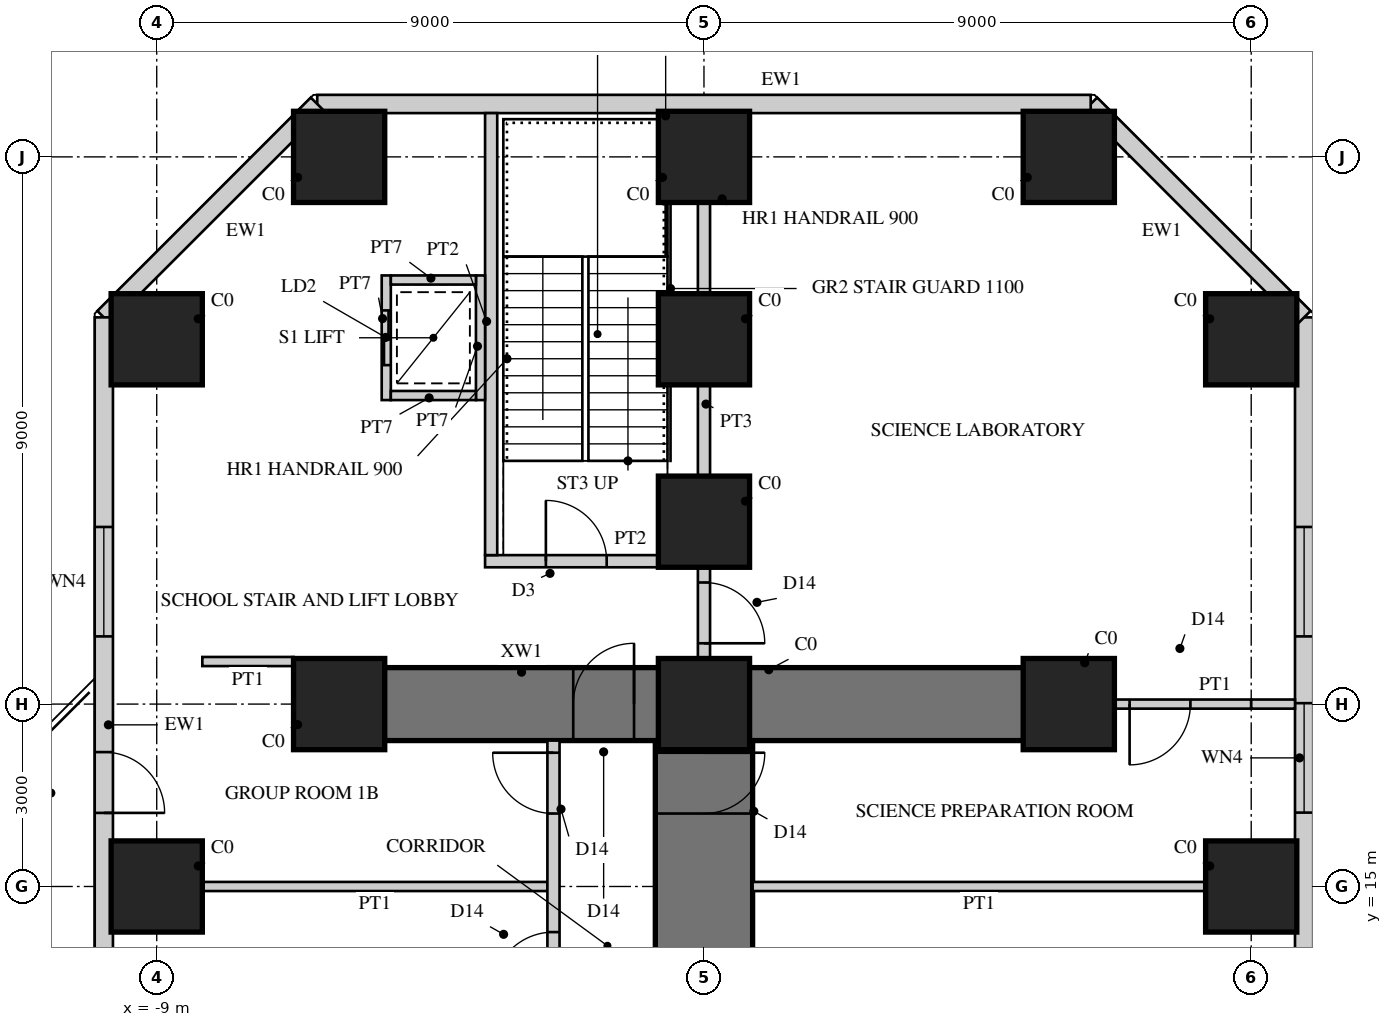
"""IFC4 building model, lengths in metres.
Left out: names, types, materials, properties, quantities, classifications, styles, units other than length and angle.
Written with IfcOpenShell. Run it as: python <this file> out.ifc"""

import sys

from ifc_helpers import new_model, si_unit, direction, frame, frame_2d, origin, origin_2d, place, context, subcontext, project, spatial, rectangle, hollow_rectangle, extrude, element, fill, save


model = new_model("IFC4")
c1 = context("Model", 3, precision=1e-05, world=origin(), true_north=direction((0.0, 1.0)))
c2 = subcontext(c1, "Body", "Model", "MODEL_VIEW")
j1 = project(units=[si_unit("LENGTHUNIT", "METRE"), si_unit("PLANEANGLEUNIT", "RADIAN")], contexts=[c1])
p1 = place(None, origin())
s1 = spatial("IfcSite", under=j1, at=p1, CompositionType="ELEMENT")
p2 = place(p1, origin())
s2 = spatial("IfcBuilding", under=s1, at=p2, CompositionType="ELEMENT")
p3 = place(p2, frame((0.0, 0.0, 5.0)))
s3 = spatial("IfcBuildingStorey", under=s2, at=p3, CompositionType="ELEMENT", Elevation=5.0)
p4 = place(p3, frame((0.0, 9.0, 0.0), z_axis=(0.0, 0.0, 1.0), x_axis=(0.0, 1.0, 0.0)))
e1 = element("IfcWall", 1, at=p4, inside=s3, PredefinedType="SHEAR", context=c2, shape_type="SweptSolid", body=[
    extrude(rectangle(XDim=9.0, YDim=1.6, at=frame_2d((4.5, 0.0))), origin(), (0.0, 0.0, 1.0), 4.5),
])
p5 = place(p4, frame((1.85, 0.0, 0.0)))
e2 = element("IfcOpeningElement", 2, at=p5, cuts=e1, PredefinedType="OPENING", context=c2, shape_type="SweptSolid", body=[
    extrude(rectangle(XDim=1.0, YDim=2.2, at=frame_2d((0.5, 1.1))), frame((0.0, 0.81, 0.0), z_axis=(0.0, -1.0, 0.0), x_axis=(1.0, 0.0, 0.0)), (0.0, 0.0, 1.0), 1.62),
])
p6 = place(p4, frame((7.2, 0.0, 0.0)))
e3 = element("IfcOpeningElement", 3, at=p6, cuts=e1, PredefinedType="OPENING", context=c2, shape_type="SweptSolid", body=[
    extrude(rectangle(XDim=1.0, YDim=2.2, at=frame_2d((0.5, 1.1))), frame((0.0, 0.81, 0.0), z_axis=(0.0, -1.0, 0.0), x_axis=(1.0, 0.0, 0.0)), (0.0, 0.0, 1.0), 1.62),
])
p7 = place(p3, frame((0.0, 18.0, 0.0), z_axis=(0.0, 0.0, 1.0), x_axis=(-1.0, 0.0, 0.0)))
e4 = element("IfcWall", 4, at=p7, inside=s3, PredefinedType="SHEAR", context=c2, shape_type="SweptSolid", body=[
    extrude(rectangle(XDim=6.0, YDim=1.2, at=frame_2d((3.0, 0.0))), origin(), (0.0, 0.0, 1.0), 4.5),
])
p8 = place(p7, frame((1.15, 0.0, 0.0)))
e5 = element("IfcOpeningElement", 5, at=p8, cuts=e4, PredefinedType="OPENING", context=c2, shape_type="SweptSolid", body=[
    extrude(rectangle(XDim=1.0, YDim=2.2, at=frame_2d((0.5, 1.1))), frame((0.0, 0.61, 0.0), z_axis=(0.0, -1.0, 0.0), x_axis=(1.0, 0.0, 0.0)), (0.0, 0.0, 1.0), 1.22),
])
p9 = place(p3, frame((0.0, 18.0, 0.0), z_axis=(0.0, 0.0, 1.0), x_axis=(1.0, 0.0, 0.0)))
e6 = element("IfcWall", 6, at=p9, inside=s3, PredefinedType="SHEAR", context=c2, shape_type="SweptSolid", body=[
    extrude(rectangle(XDim=6.0, YDim=1.2, at=frame_2d((3.0, 0.0))), origin(), (0.0, 0.0, 1.0), 4.5),
])
for number, where, z_axis, x_axis in (
    (7, (9.0, 15.0, 0.0), (0.0, 0.0, 1.0), (1.0, 0.0, 0.0)),
    (8, (9.0, 24.0, 0.0), (0.0, 0.0, 1.0), (1.0, 0.0, 0.0)),
    (9, (-9.0, 15.0, 0.0), (0.0, 0.0, 1.0), (1.0, 0.0, 0.0)),
    (10, (-9.0, 24.0, 0.0), (0.0, 0.0, 1.0), (1.0, 0.0, 0.0)),
    (11, (6.0, 27.0, 0.0), (0.0, 0.0, 1.0), (1.0, 0.0, 0.0)),
    (12, (0.0, 27.0, 0.0), (0.0, 0.0, 1.0), (1.0, 0.0, 0.0)),
    (13, (-6.0, 27.0, 0.0), (0.0, 0.0, 1.0), (1.0, 0.0, 0.0)),
    (14, (6.0, 18.0, 0.0), (0.0, 0.0, 1.0), (1.0, 0.0, 0.0)),
    (15, (0.0, 18.0, 0.0), (0.0, 0.0, 1.0), (1.0, 0.0, 0.0)),
    (16, (-6.0, 18.0, 0.0), (0.0, 0.0, 1.0), (1.0, 0.0, 0.0)),
    (17, (0.0, 21.0, 0.0), (0.0, 0.0, 1.0), (1.0, 0.0, 0.0)),
    (18, (0.0, 24.0, 0.0), (0.0, 0.0, 1.0), (1.0, 0.0, 0.0)),
):
    element("IfcColumn", number, at=place(p3, frame(where, z_axis=z_axis, x_axis=x_axis)), inside=s3, PredefinedType="COLUMN", context=c2, shape_type="SweptSolid", body=[
        extrude(rectangle(XDim=1.5, YDim=1.5, at=origin_2d()), origin(), (0.0, 0.0, 1.0), 4.5),
    ])
p10 = place(p3, frame((9.87, 9.87, 0.0), z_axis=(0.0, 0.0, 1.0), x_axis=(0.0, 1.0, 0.0)))
e19 = element("IfcWall", 19, at=p10, inside=s3, PredefinedType="SOLIDWALL", context=c2, shape_type="SweptSolid", body=[
    extrude(rectangle(XDim=14.49, YDim=0.3, at=frame_2d((7.245, 0.0))), origin(), (0.0, 0.0, 1.0), 4.3),
])
p11 = place(p10, frame((2.9, 0.0, 0.0)))
e20 = element("IfcOpeningElement", 20, at=p11, cuts=e19, PredefinedType="OPENING", context=c2, shape_type="SweptSolid", body=[
    extrude(rectangle(XDim=1.0, YDim=2.4, at=frame_2d((0.5, 1.2))), frame((0.0, 0.16, 0.0), z_axis=(0.0, -1.0, 0.0), x_axis=(1.0, 0.0, 0.0)), (0.0, 0.0, 1.0), 0.32),
])
p12 = place(p10, frame((0.549, 0.0, 0.6)))
e21 = element("IfcOpeningElement", 21, at=p12, cuts=e19, PredefinedType="OPENING", context=c2, shape_type="SweptSolid", body=[
    extrude(rectangle(XDim=1.8, YDim=2.1, at=frame_2d((0.9, 1.05))), frame((0.0, 0.16, 0.0), z_axis=(0.0, -1.0, 0.0), x_axis=(1.0, 0.0, 0.0)), (0.0, 0.0, 1.0), 0.32),
])
p13 = place(p10, frame((6.345, 0.0, 0.6)))
e22 = element("IfcOpeningElement", 22, at=p13, cuts=e19, PredefinedType="OPENING", context=c2, shape_type="SweptSolid", body=[
    extrude(rectangle(XDim=1.8, YDim=2.1, at=frame_2d((0.9, 1.05))), frame((0.0, 0.16, 0.0), z_axis=(0.0, -1.0, 0.0), x_axis=(1.0, 0.0, 0.0)), (0.0, 0.0, 1.0), 0.32),
])
p14 = place(p10, frame((9.243, 0.0, 0.6)))
e23 = element("IfcOpeningElement", 23, at=p14, cuts=e19, PredefinedType="OPENING", context=c2, shape_type="SweptSolid", body=[
    extrude(rectangle(XDim=1.8, YDim=2.1, at=frame_2d((0.9, 1.05))), frame((0.0, 0.16, 0.0), z_axis=(0.0, -1.0, 0.0), x_axis=(1.0, 0.0, 0.0)), (0.0, 0.0, 1.0), 0.32),
])
p15 = place(p3, frame((9.87, 24.36, 0.0), z_axis=(0.0, 0.0, 1.0), x_axis=(-0.707106781187, 0.707106781187, 0.0)))
e24 = element("IfcWall", 24, at=p15, inside=s3, PredefinedType="SOLIDWALL", context=c2, shape_type="SweptSolid", body=[
    extrude(rectangle(XDim=4.964, YDim=0.3, at=frame_2d((2.482, 0.0))), origin(), (0.0, 0.0, 1.0), 4.3),
])
p16 = place(p3, frame((6.36, 27.87, 0.0), z_axis=(0.0, 0.0, 1.0), x_axis=(-1.0, 0.0, 0.0)))
e25 = element("IfcWall", 25, at=p16, inside=s3, PredefinedType="SOLIDWALL", context=c2, shape_type="SweptSolid", body=[
    extrude(rectangle(XDim=12.721, YDim=0.3, at=frame_2d((6.36, 0.0))), origin(), (0.0, 0.0, 1.0), 4.3),
])
p17 = place(p3, frame((-6.36, 27.87, 0.0), z_axis=(0.0, 0.0, 1.0), x_axis=(-0.707106781187, -0.707106781187, 0.0)))
e26 = element("IfcWall", 26, at=p17, inside=s3, PredefinedType="SOLIDWALL", context=c2, shape_type="SweptSolid", body=[
    extrude(rectangle(XDim=4.964, YDim=0.3, at=frame_2d((2.482, 0.0))), origin(), (0.0, 0.0, 1.0), 4.3),
])
p18 = place(p3, frame((-9.87, 24.36, 0.0), z_axis=(0.0, 0.0, 1.0), x_axis=(0.0, -1.0, 0.0)))
e27 = element("IfcWall", 27, at=p18, inside=s3, PredefinedType="SOLIDWALL", context=c2, shape_type="SweptSolid", body=[
    extrude(rectangle(XDim=14.49, YDim=0.3, at=frame_2d((7.245, 0.0))), origin(), (0.0, 0.0, 1.0), 4.3),
])
p19 = place(p18, frame((7.15, 0.0, 0.0)))
e28 = element("IfcOpeningElement", 28, at=p19, cuts=e27, PredefinedType="OPENING", context=c2, shape_type="SweptSolid", body=[
    extrude(rectangle(XDim=1.0, YDim=2.4, at=frame_2d((0.5, 1.2))), frame((0.0, 0.16, 0.0), z_axis=(0.0, -1.0, 0.0), x_axis=(1.0, 0.0, 0.0)), (0.0, 0.0, 1.0), 0.32),
])
p20 = place(p18, frame((3.447, 0.0, 0.6)))
e29 = element("IfcOpeningElement", 29, at=p20, cuts=e27, PredefinedType="OPENING", context=c2, shape_type="SweptSolid", body=[
    extrude(rectangle(XDim=1.8, YDim=2.1, at=frame_2d((0.9, 1.05))), frame((0.0, 0.16, 0.0), z_axis=(0.0, -1.0, 0.0), x_axis=(1.0, 0.0, 0.0)), (0.0, 0.0, 1.0), 0.32),
])
p21 = place(p18, frame((12.141, 0.0, 0.6)))
e30 = element("IfcOpeningElement", 30, at=p21, cuts=e27, PredefinedType="OPENING", context=c2, shape_type="SweptSolid", body=[
    extrude(rectangle(XDim=1.8, YDim=2.1, at=frame_2d((0.9, 1.05))), frame((0.0, 0.16, 0.0), z_axis=(0.0, -1.0, 0.0), x_axis=(1.0, 0.0, 0.0)), (0.0, 0.0, 1.0), 0.32),
])
p22 = place(p3, frame((-2.575, 15.0, 0.0), z_axis=(0.0, 0.0, 1.0), x_axis=(-1.0, 0.0, 0.0)))
e31 = element("IfcWall", 31, at=p22, inside=s3, PredefinedType="PARTITIONING", context=c2, shape_type="SweptSolid", body=[
    extrude(rectangle(XDim=5.675, YDim=0.15, at=frame_2d((2.837, 0.0))), origin(), (0.0, 0.0, 1.0), 3.35),
])
p23 = place(p3, frame((8.25, 15.0, 0.0), z_axis=(0.0, 0.0, 1.0), x_axis=(-1.0, 0.0, 0.0)))
e32 = element("IfcWall", 32, at=p23, inside=s3, PredefinedType="PARTITIONING", context=c2, shape_type="SweptSolid", body=[
    extrude(rectangle(XDim=7.45, YDim=0.15, at=frame_2d((3.725, 0.0))), origin(), (0.0, 0.0, 1.0), 3.35),
])
p24 = place(p3, frame((-2.475, 9.65, 0.0), z_axis=(0.0, 0.0, 1.0), x_axis=(0.0, 1.0, 0.0)))
e33 = element("IfcWall", 33, at=p24, inside=s3, PredefinedType="SOLIDWALL", context=c2, shape_type="SweptSolid", body=[
    extrude(rectangle(XDim=7.75, YDim=0.2, at=frame_2d((3.875, 0.0))), origin(), (0.0, 0.0, 1.0), 4.3),
])
p25 = place(p24, frame((1.2, 0.0, 0.0)))
e34 = element("IfcOpeningElement", 34, at=p25, cuts=e33, PredefinedType="OPENING", context=c2, shape_type="SweptSolid", body=[
    extrude(rectangle(XDim=1.0, YDim=2.2, at=frame_2d((0.5, 1.1))), frame((0.0, 0.11, 0.0), z_axis=(0.0, -1.0, 0.0), x_axis=(1.0, 0.0, 0.0)), (0.0, 0.0, 1.0), 0.22),
])
p26 = place(p24, frame((3.6, 0.0, 0.0)))
e35 = element("IfcOpeningElement", 35, at=p26, cuts=e33, PredefinedType="OPENING", context=c2, shape_type="SweptSolid", body=[
    extrude(rectangle(XDim=1.0, YDim=2.2, at=frame_2d((0.5, 1.1))), frame((0.0, 0.11, 0.0), z_axis=(0.0, -1.0, 0.0), x_axis=(1.0, 0.0, 0.0)), (0.0, 0.0, 1.0), 0.22),
])
p27 = place(p24, frame((6.55, 0.0, 0.0)))
e36 = element("IfcOpeningElement", 36, at=p27, cuts=e33, PredefinedType="OPENING", context=c2, shape_type="SweptSolid", body=[
    extrude(rectangle(XDim=1.0, YDim=2.2, at=frame_2d((0.5, 1.1))), frame((0.0, 0.11, 0.0), z_axis=(0.0, -1.0, 0.0), x_axis=(1.0, 0.0, 0.0)), (0.0, 0.0, 1.0), 0.22),
])
p28 = place(p3, frame((-6.75, 18.7, 0.0), z_axis=(0.0, 0.0, 1.0), x_axis=(-1.0, 0.0, 0.0)))
e37 = element("IfcWall", 37, at=p28, inside=s3, PredefinedType="PARTITIONING", context=c2, shape_type="SweptSolid", body=[
    extrude(rectangle(XDim=1.5, YDim=0.15, at=frame_2d((0.75, 0.0))), origin(), (0.0, 0.0, 1.0), 4.3),
])
p29 = place(p3, frame((-0.1, 20.35, 0.0), z_axis=(0.0, 0.0, 1.0), x_axis=(-1.0, 0.0, 0.0)))
e38 = element("IfcWall", 38, at=p29, inside=s3, PredefinedType="SOLIDWALL", context=c2, shape_type="SweptSolid", body=[
    extrude(rectangle(XDim=3.5, YDim=0.2, at=frame_2d((1.75, 0.0))), origin(), (0.0, 0.0, 1.0), 4.3),
])
p30 = place(p29, frame((1.5, 0.0, 0.0)))
e39 = element("IfcOpeningElement", 39, at=p30, cuts=e38, PredefinedType="OPENING", context=c2, shape_type="SweptSolid", body=[
    extrude(rectangle(XDim=1.0, YDim=2.1, at=frame_2d((0.5, 1.05))), frame((0.0, 0.11, 0.0), z_axis=(0.0, -1.0, 0.0), x_axis=(1.0, 0.0, 0.0)), (0.0, 0.0, 1.0), 0.22),
])
p31 = place(p3, frame((-3.5, 20.45, 0.0), z_axis=(0.0, 0.0, 1.0), x_axis=(0.0, 1.0, 0.0)))
e40 = element("IfcWall", 40, at=p31, inside=s3, PredefinedType="SOLIDWALL", context=c2, shape_type="SweptSolid", body=[
    extrude(rectangle(XDim=7.27, YDim=0.2, at=frame_2d((3.635, 0.0))), origin(), (0.0, 0.0, 1.0), 4.3),
])
p32 = place(p3, frame((-3.675, 23.0, 0.0), z_axis=(0.0, 0.0, 1.0), x_axis=(0.0, 1.0, 0.0)))
e41 = element("IfcWall", 41, at=p32, inside=s3, PredefinedType="PARTITIONING", context=c2, shape_type="SweptSolid", body=[
    extrude(rectangle(XDim=2.05, YDim=0.15, at=frame_2d((1.025, 0.0))), origin(), (0.0, 0.0, 1.0), 4.3),
])
p33 = place(p3, frame((-5.225, 23.0, 0.0), z_axis=(0.0, 0.0, 1.0), x_axis=(0.0, 1.0, 0.0)))
e42 = element("IfcWall", 42, at=p33, inside=s3, PredefinedType="PARTITIONING", context=c2, shape_type="SweptSolid", body=[
    extrude(rectangle(XDim=2.05, YDim=0.15, at=frame_2d((1.025, 0.0))), origin(), (0.0, 0.0, 1.0), 4.3),
])
p34 = place(p33, frame((0.575, 0.0, 0.0)))
e43 = element("IfcOpeningElement", 43, at=p34, cuts=e42, PredefinedType="OPENING", context=c2, shape_type="SweptSolid", body=[
    extrude(rectangle(XDim=0.9, YDim=2.1, at=frame_2d((0.45, 1.05))), frame((0.0, 0.085, 0.0), z_axis=(0.0, -1.0, 0.0), x_axis=(1.0, 0.0, 0.0)), (0.0, 0.0, 1.0), 0.17),
])
for number, where, z_axis, x_axis in (
    (44, (-3.75, 23.075, 0.0), (0.0, 0.0, 1.0), (-1.0, 0.0, 0.0)),
    (45, (-3.75, 24.975, 0.0), (0.0, 0.0, 1.0), (-1.0, 0.0, 0.0)),
):
    element("IfcWall", number, at=place(p3, frame(where, z_axis=z_axis, x_axis=x_axis)), inside=s3, PredefinedType="PARTITIONING", context=c2, shape_type="SweptSolid", body=[
        extrude(rectangle(XDim=1.4, YDim=0.15, at=frame_2d((0.7, 0.0))), origin(), (0.0, 0.0, 1.0), 4.3),
    ])
p35 = place(p3, frame((6.75, 18.0, 0.0), z_axis=(0.0, 0.0, 1.0), x_axis=(1.0, 0.0, 0.0)))
e46 = element("IfcWall", 46, at=p35, inside=s3, PredefinedType="PARTITIONING", context=c2, shape_type="SweptSolid", body=[
    extrude(rectangle(XDim=2.25, YDim=0.15, at=frame_2d((1.125, 0.0))), origin(), (0.0, 0.0, 1.0), 3.35),
])
p36 = place(p35, frame((0.25, 0.0, 0.0)))
e47 = element("IfcOpeningElement", 47, at=p36, cuts=e46, PredefinedType="OPENING", context=c2, shape_type="SweptSolid", body=[
    extrude(rectangle(XDim=1.0, YDim=2.2, at=frame_2d((0.5, 1.1))), frame((0.0, 0.085, 0.0), z_axis=(0.0, -1.0, 0.0), x_axis=(1.0, 0.0, 0.0)), (0.0, 0.0, 1.0), 0.17),
])
p37 = place(p3, frame((9.0, 18.0, 0.0), z_axis=(0.0, 0.0, 1.0), x_axis=(1.0, 0.0, 0.0)))
e48 = element("IfcWall", 48, at=p37, inside=s3, PredefinedType="PARTITIONING", context=c2, shape_type="SweptSolid", body=[
    extrude(rectangle(XDim=0.72, YDim=0.15, at=frame_2d((0.36, 0.0))), origin(), (0.0, 0.0, 1.0), 4.3),
])
p38 = place(p3, frame((0.0, 18.0, 0.0), z_axis=(0.0, 0.0, 1.0), x_axis=(0.0, 1.0, 0.0)))
e49 = element("IfcWall", 49, at=p38, inside=s3, PredefinedType="SOLIDWALL", context=c2, shape_type="SweptSolid", body=[
    extrude(rectangle(XDim=3.0, YDim=0.2, at=frame_2d((1.5, 0.0))), origin(), (0.0, 0.0, 1.0), 4.3),
])
p39 = place(p38, frame((1.0, 0.0, 0.0)))
e50 = element("IfcOpeningElement", 50, at=p39, cuts=e49, PredefinedType="OPENING", context=c2, shape_type="SweptSolid", body=[
    extrude(rectangle(XDim=1.0, YDim=2.2, at=frame_2d((0.5, 1.1))), frame((0.0, 0.11, 0.0), z_axis=(0.0, -1.0, 0.0), x_axis=(1.0, 0.0, 0.0)), (0.0, 0.0, 1.0), 0.22),
])
p40 = place(p3, frame((0.0, 21.0, 0.0), z_axis=(0.0, 0.0, 1.0), x_axis=(0.0, 1.0, 0.0)))
e51 = element("IfcWall", 51, at=p40, inside=s3, PredefinedType="SOLIDWALL", context=c2, shape_type="SweptSolid", body=[
    extrude(rectangle(XDim=6.0, YDim=0.2, at=frame_2d((3.0, 0.0))), origin(), (0.0, 0.0, 1.0), 3.3),
])
p41 = place(p13, origin())
e52 = element("IfcWindow", 52, at=p41, inside=s3, PartitioningType="SINGLE_PANEL", PredefinedType="WINDOW", context=c2, shape_type="SweptSolid", body=[
    extrude(hollow_rectangle(XDim=1.8, YDim=2.1, WallThickness=0.06, at=frame_2d((0.9, 1.05))), frame((0.0, 0.03, 0.0), z_axis=(0.0, -1.0, 0.0), x_axis=(1.0, 0.0, 0.0)), (0.0, 0.0, 1.0), 0.06),
    extrude(rectangle(XDim=1.679, YDim=1.979, at=frame_2d((0.9, 1.05))), frame((0.0, 0.03, 0.0), z_axis=(0.0, -1.0, 0.0), x_axis=(1.0, 0.0, 0.0)), (0.0, 0.0, 1.0), 0.06),
])
fill(e22, e52)
p42 = place(p14, origin())
e53 = element("IfcWindow", 53, at=p42, inside=s3, PartitioningType="SINGLE_PANEL", PredefinedType="WINDOW", context=c2, shape_type="SweptSolid", body=[
    extrude(hollow_rectangle(XDim=1.8, YDim=2.1, WallThickness=0.06, at=frame_2d((0.9, 1.05))), frame((0.0, 0.03, 0.0), z_axis=(0.0, -1.0, 0.0), x_axis=(1.0, 0.0, 0.0)), (0.0, 0.0, 1.0), 0.06),
    extrude(rectangle(XDim=1.679, YDim=1.979, at=frame_2d((0.9, 1.05))), frame((0.0, 0.03, 0.0), z_axis=(0.0, -1.0, 0.0), x_axis=(1.0, 0.0, 0.0)), (0.0, 0.0, 1.0), 0.06),
])
fill(e23, e53)
p43 = place(p19, origin())
e54 = element("IfcDoor", 54, at=p43, inside=s3, OperationType="SINGLE_SWING_RIGHT", PredefinedType="DOOR", context=c2, shape_type="SweptSolid", body=[
    extrude(hollow_rectangle(XDim=1.0, YDim=2.4, WallThickness=0.06, at=frame_2d((0.5, 1.2))), frame((0.0, 0.025, 0.0), z_axis=(0.0, -1.0, 0.0), x_axis=(1.0, 0.0, 0.0)), (0.0, 0.0, 1.0), 0.05),
    extrude(rectangle(XDim=0.879, YDim=2.279, at=frame_2d((0.5, 1.2))), frame((0.0, 0.025, 0.0), z_axis=(0.0, -1.0, 0.0), x_axis=(1.0, 0.0, 0.0)), (0.0, 0.0, 1.0), 0.05),
])
fill(e28, e54)
p44 = place(p20, origin())
e55 = element("IfcWindow", 55, at=p44, inside=s3, PartitioningType="SINGLE_PANEL", PredefinedType="WINDOW", context=c2, shape_type="SweptSolid", body=[
    extrude(hollow_rectangle(XDim=1.8, YDim=2.1, WallThickness=0.06, at=frame_2d((0.9, 1.05))), frame((0.0, 0.03, 0.0), z_axis=(0.0, -1.0, 0.0), x_axis=(1.0, 0.0, 0.0)), (0.0, 0.0, 1.0), 0.06),
    extrude(rectangle(XDim=1.679, YDim=1.979, at=frame_2d((0.9, 1.05))), frame((0.0, 0.03, 0.0), z_axis=(0.0, -1.0, 0.0), x_axis=(1.0, 0.0, 0.0)), (0.0, 0.0, 1.0), 0.06),
])
fill(e29, e55)
p45 = place(p26, origin())
e56 = element("IfcDoor", 56, at=p45, inside=s3, OperationType="SINGLE_SWING_LEFT", PredefinedType="DOOR", context=c2, shape_type="SweptSolid", body=[
    extrude(rectangle(XDim=1.0, YDim=2.2, at=frame_2d((0.5, 1.1))), frame((0.0, 0.025, 0.0), z_axis=(0.0, -1.0, 0.0), x_axis=(1.0, 0.0, 0.0)), (0.0, 0.0, 1.0), 0.05),
])
fill(e35, e56)
p46 = place(p27, origin())
e57 = element("IfcDoor", 57, at=p46, inside=s3, OperationType="SINGLE_SWING_RIGHT", PredefinedType="DOOR", context=c2, shape_type="SweptSolid", body=[
    extrude(rectangle(XDim=1.0, YDim=2.2, at=frame_2d((0.5, 1.1))), frame((0.0, 0.025, 0.0), z_axis=(0.0, -1.0, 0.0), x_axis=(1.0, 0.0, 0.0)), (0.0, 0.0, 1.0), 0.05),
])
fill(e36, e57)
p47 = place(p30, frame((1.0, 0.0, 0.0), z_axis=(0.0, 0.0, 1.0), x_axis=(-1.0, 0.0, 0.0)))
e58 = element("IfcDoor", 58, at=p47, inside=s3, OperationType="SINGLE_SWING_LEFT", PredefinedType="DOOR", context=c2, shape_type="SweptSolid", body=[
    extrude(rectangle(XDim=1.0, YDim=2.1, at=frame_2d((0.5, 1.05))), frame((0.0, 0.025, 0.0), z_axis=(0.0, -1.0, 0.0), x_axis=(1.0, 0.0, 0.0)), (0.0, 0.0, 1.0), 0.05),
])
fill(e39, e58)
p48 = place(p34, origin())
e59 = element("IfcDoor", 59, at=p48, inside=s3, OperationType="DOUBLE_DOOR_SLIDING", PredefinedType="DOOR", context=c2, shape_type="SweptSolid", body=[
    extrude(rectangle(XDim=0.9, YDim=2.1, at=frame_2d((0.45, 1.05))), frame((0.0, 0.025, 0.0), z_axis=(0.0, -1.0, 0.0), x_axis=(1.0, 0.0, 0.0)), (0.0, 0.0, 1.0), 0.05),
])
fill(e43, e59)
p49 = place(p36, frame((1.0, 0.0, 0.0), z_axis=(0.0, 0.0, 1.0), x_axis=(-1.0, 0.0, 0.0)))
e60 = element("IfcDoor", 60, at=p49, inside=s3, OperationType="SINGLE_SWING_RIGHT", PredefinedType="DOOR", context=c2, shape_type="SweptSolid", body=[
    extrude(rectangle(XDim=1.0, YDim=2.2, at=frame_2d((0.5, 1.1))), frame((0.0, 0.025, 0.0), z_axis=(0.0, -1.0, 0.0), x_axis=(1.0, 0.0, 0.0)), (0.0, 0.0, 1.0), 0.05),
])
fill(e47, e60)
p50 = place(p6, frame((1.0, 0.0, 0.0), z_axis=(0.0, 0.0, 1.0), x_axis=(-1.0, 0.0, 0.0)))
e61 = element("IfcDoor", 61, at=p50, inside=s3, OperationType="SINGLE_SWING_LEFT", PredefinedType="DOOR", context=c2, shape_type="SweptSolid", body=[
    extrude(rectangle(XDim=1.0, YDim=2.2, at=frame_2d((0.5, 1.1))), frame((0.0, 0.025, 0.0), z_axis=(0.0, -1.0, 0.0), x_axis=(1.0, 0.0, 0.0)), (0.0, 0.0, 1.0), 0.05),
])
fill(e3, e61)
p51 = place(p39, frame((1.0, 0.0, 0.0), z_axis=(0.0, 0.0, 1.0), x_axis=(-1.0, 0.0, 0.0)))
e62 = element("IfcDoor", 62, at=p51, inside=s3, OperationType="SINGLE_SWING_RIGHT", PredefinedType="DOOR", context=c2, shape_type="SweptSolid", body=[
    extrude(rectangle(XDim=1.0, YDim=2.2, at=frame_2d((0.5, 1.1))), frame((0.0, 0.025, 0.0), z_axis=(0.0, -1.0, 0.0), x_axis=(1.0, 0.0, 0.0)), (0.0, 0.0, 1.0), 0.05),
])
fill(e50, e62)
p52 = place(p8, frame((1.0, 0.0, 0.0), z_axis=(0.0, 0.0, 1.0), x_axis=(-1.0, 0.0, 0.0)))
e63 = element("IfcDoor", 63, at=p52, inside=s3, OperationType="SINGLE_SWING_RIGHT", PredefinedType="DOOR", context=c2, shape_type="SweptSolid", body=[
    extrude(rectangle(XDim=1.0, YDim=2.2, at=frame_2d((0.5, 1.1))), frame((0.0, 0.025, 0.0), z_axis=(0.0, -1.0, 0.0), x_axis=(1.0, 0.0, 0.0)), (0.0, 0.0, 1.0), 0.05),
])
fill(e5, e63)
save(model, sys.argv[1])
